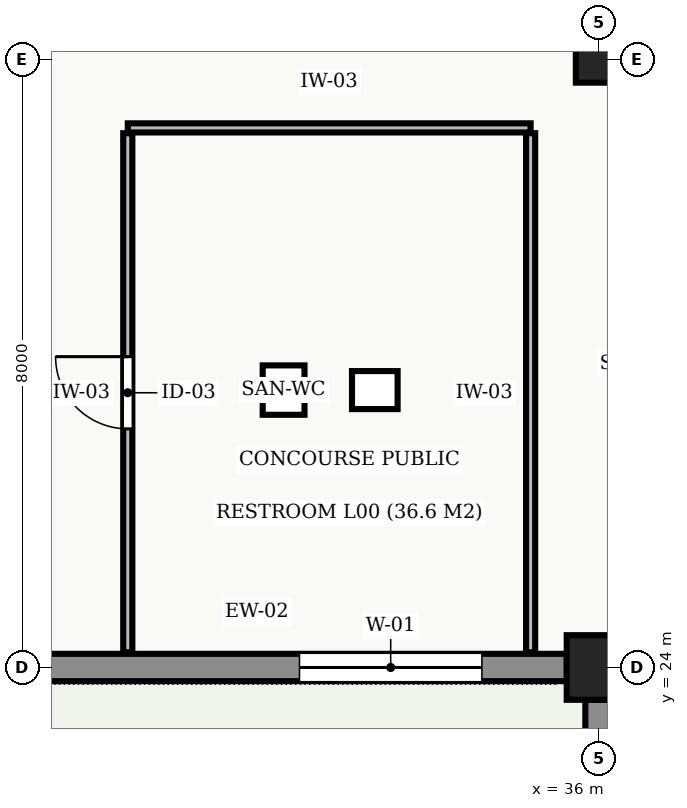
"""IFC4 building model, lengths in metres.
Left out: names, types, materials, properties, quantities, classifications, styles, units other than length and angle.
Written with IfcOpenShell. Run it as: python <this file> out.ifc"""

import sys

from ifc_helpers import new_model, si_unit, direction, frame, frame_2d, origin, origin_2d, place, context, subcontext, project, spatial, rectangle, hollow_circle, extrude, element, fill, save


model = new_model("IFC4")
c1 = context("Model", 3, precision=1e-05, world=origin(), true_north=direction((0.0, 1.0)))
c2 = subcontext(c1, "Body", "Model", "MODEL_VIEW")
j1 = project(units=[si_unit("LENGTHUNIT", "METRE"), si_unit("PLANEANGLEUNIT", "RADIAN")], contexts=[c1])
p1 = place(None, origin())
s1 = spatial("IfcSite", under=j1, at=p1, CompositionType="ELEMENT")
p2 = place(p1, origin())
s2 = spatial("IfcBuilding", under=s1, at=p2, CompositionType="ELEMENT")
p3 = place(p2, origin())
s3 = spatial("IfcBuildingStorey", under=s2, at=p3, CompositionType="ELEMENT", Elevation=0.0)
p4 = place(p3, frame((36.0, 24.0, 0.0), z_axis=(0.0, 0.0, 1.0), x_axis=(1.0, 0.0, 0.0)))
e1 = element("IfcColumn", 1, at=p4, inside=s3, PredefinedType="COLUMN", context=c2, shape_type="SweptSolid", body=[
    extrude(rectangle(XDim=0.85, YDim=0.85, at=origin_2d()), origin(), (0.0, 0.0, 1.0), 5.4),
])
p5 = place(p3, frame((36.0, 32.0, 0.0), z_axis=(0.0, 0.0, 1.0), x_axis=(1.0, 0.0, 0.0)))
e2 = element("IfcColumn", 2, at=p5, inside=s3, PredefinedType="COLUMN", context=c2, shape_type="SweptSolid", body=[
    extrude(hollow_circle(Radius=0.305, WallThickness=0.02, at=origin_2d()), origin(), (0.0, 0.0, 1.0), 5.4),
])
p6 = place(p3, frame((36.0, 16.423, 0.0), z_axis=(0.0, 0.0, 1.0), x_axis=(0.0, 1.0, 0.0)))
e3 = element("IfcWall", 3, at=p6, inside=s3, PredefinedType="STANDARD", context=c2, shape_type="SweptSolid", body=[
    extrude(rectangle(XDim=7.154, YDim=0.36, at=frame_2d((3.577, 0.0))), origin(), (0.0, 0.0, 1.0), 4.38),
])
p7 = place(p6, frame((0.985, 0.0, 0.9)))
e4 = element("IfcOpeningElement", 4, at=p7, cuts=e3, PredefinedType="OPENING", context=c2, shape_type="SweptSolid", body=[
    extrude(rectangle(XDim=2.1, YDim=3.0, at=frame_2d((1.05, 1.5))), frame((0.0, 0.192, 0.0), z_axis=(0.0, -1.0, 0.0), x_axis=(1.0, 0.0, 0.0)), (0.0, 0.0, 1.0), 0.384),
])
p8 = place(p6, frame((4.069, 0.0, 0.9)))
e5 = element("IfcOpeningElement", 5, at=p8, cuts=e3, PredefinedType="OPENING", context=c2, shape_type="SweptSolid", body=[
    extrude(rectangle(XDim=2.1, YDim=3.0, at=frame_2d((1.05, 1.5))), frame((0.0, 0.192, 0.0), z_axis=(0.0, -1.0, 0.0), x_axis=(1.0, 0.0, 0.0)), (0.0, 0.0, 1.0), 0.384),
])
p9 = place(p3, frame((35.577, 24.0, 0.0), z_axis=(0.0, 0.0, 1.0), x_axis=(-1.0, 0.0, 0.0)))
e6 = element("IfcWall", 6, at=p9, inside=s3, PredefinedType="STANDARD", context=c2, shape_type="SweptSolid", body=[
    extrude(rectangle(XDim=8.154, YDim=0.36, at=frame_2d((4.077, 0.0))), origin(), (0.0, 0.0, 1.0), 4.38),
])
p10 = place(p9, frame((1.118, 0.0, 0.9)))
e7 = element("IfcOpeningElement", 7, at=p10, cuts=e6, PredefinedType="OPENING", context=c2, shape_type="SweptSolid", body=[
    extrude(rectangle(XDim=2.4, YDim=3.2, at=frame_2d((1.2, 1.6))), frame((0.0, 0.192, 0.0), z_axis=(0.0, -1.0, 0.0), x_axis=(1.0, 0.0, 0.0)), (0.0, 0.0, 1.0), 0.384),
])
p11 = place(p3, frame((29.8, 31.1, 0.0), z_axis=(0.0, 0.0, 1.0), x_axis=(1.0, 0.0, 0.0)))
e8 = element("IfcWall", 8, at=p11, inside=s3, PredefinedType="STANDARD", context=c2, shape_type="SweptSolid", body=[
    extrude(rectangle(XDim=5.3, YDim=0.12, at=frame_2d((2.65, 0.0))), origin(), (0.0, 0.0, 1.0), 5.05),
])
p12 = place(p3, frame((29.8, 24.2, 0.0), z_axis=(0.0, 0.0, 1.0), x_axis=(0.0, 1.0, 0.0)))
e9 = element("IfcWall", 9, at=p12, inside=s3, PredefinedType="STANDARD", context=c2, shape_type="SweptSolid", body=[
    extrude(rectangle(XDim=6.83, YDim=0.12, at=frame_2d((3.415, 0.0))), origin(), (0.0, 0.0, 1.0), 5.05),
])
p13 = place(p12, frame((2.94, 0.0, 0.0)))
e10 = element("IfcOpeningElement", 10, at=p13, cuts=e9, PredefinedType="OPENING", context=c2, shape_type="SweptSolid", body=[
    extrude(rectangle(XDim=0.95, YDim=2.1, at=frame_2d((0.475, 1.05))), frame((0.0, 0.072, 0.0), z_axis=(0.0, -1.0, 0.0), x_axis=(1.0, 0.0, 0.0)), (0.0, 0.0, 1.0), 0.144),
])
p14 = place(p3, frame((35.1, 24.2, 0.0), z_axis=(0.0, 0.0, 1.0), x_axis=(0.0, 1.0, 0.0)))
e11 = element("IfcWall", 11, at=p14, inside=s3, PredefinedType="STANDARD", context=c2, shape_type="SweptSolid", body=[
    extrude(rectangle(XDim=6.83, YDim=0.12, at=frame_2d((3.415, 0.0))), origin(), (0.0, 0.0, 1.0), 5.05),
])
p15 = place(p10, origin())
e12 = element("IfcWindow", 12, at=p15, inside=s3, PartitioningType="SINGLE_PANEL", PredefinedType="WINDOW", context=c2, shape_type="SweptSolid", body=[
    extrude(rectangle(XDim=2.4, YDim=3.2, at=frame_2d((1.2, 1.6))), frame((0.0, 0.03, 0.0), z_axis=(0.0, -1.0, 0.0), x_axis=(1.0, 0.0, 0.0)), (0.0, 0.0, 1.0), 0.06),
])
fill(e7, e12)
p16 = place(p13, origin())
e13 = element("IfcDoor", 13, at=p16, inside=s3, OperationType="SINGLE_SWING_RIGHT", PredefinedType="DOOR", context=c2, shape_type="SweptSolid", body=[
    extrude(rectangle(XDim=0.95, YDim=2.1, at=frame_2d((0.475, 1.05))), frame((0.0, 0.025, 0.0), z_axis=(0.0, -1.0, 0.0), x_axis=(1.0, 0.0, 0.0)), (0.0, 0.0, 1.0), 0.05),
])
fill(e10, e13)
save(model, sys.argv[1])
